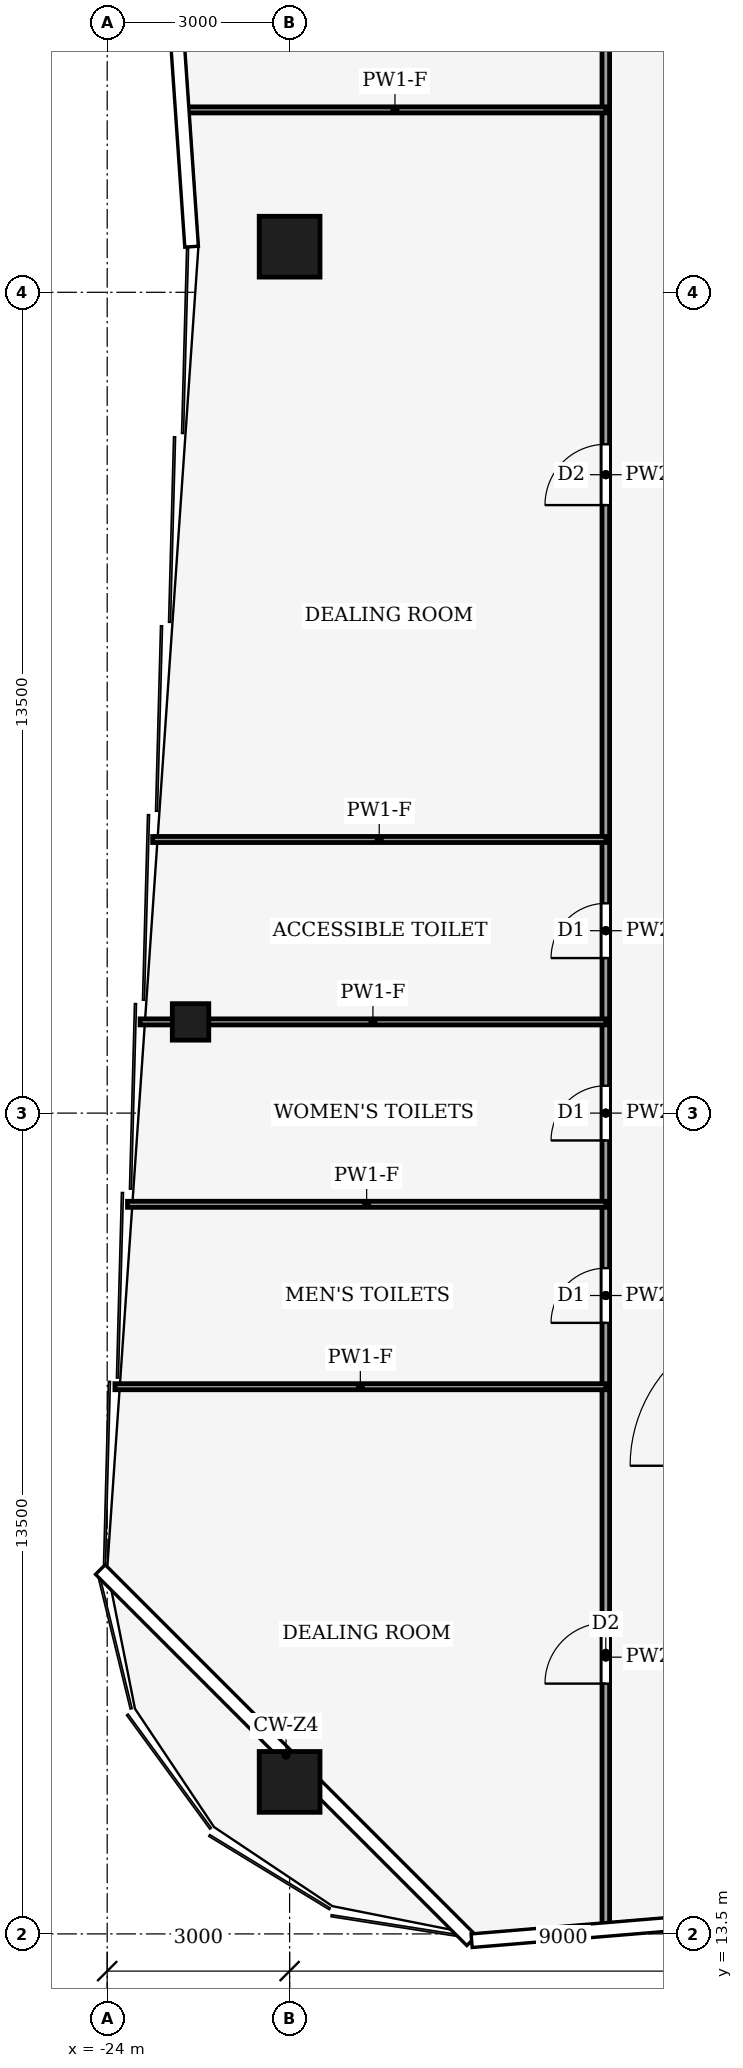
"""IFC4 building model, lengths in metres.
Left out: names, types, materials, properties, quantities, classifications, styles, units other than length and angle.
Written with IfcOpenShell. Run it as: python <this file> out.ifc"""

import sys

from ifc_helpers import new_model, si_unit, direction, frame, frame_2d, origin, origin_2d, place, context, subcontext, project, spatial, rectangle, hollow_rectangle, extrude, element, fill, save


model = new_model("IFC4")
c1 = context("Model", 3, precision=1e-05, world=origin(), true_north=direction((0.0, 1.0)))
c2 = subcontext(c1, "Body", "Model", "MODEL_VIEW")
j1 = project(units=[si_unit("LENGTHUNIT", "METRE"), si_unit("PLANEANGLEUNIT", "RADIAN")], contexts=[c1])
p1 = place(None, origin())
s1 = spatial("IfcSite", under=j1, at=p1, CompositionType="ELEMENT")
p2 = place(p1, origin())
s2 = spatial("IfcBuilding", under=s1, at=p2, CompositionType="ELEMENT")
p3 = place(p2, frame((0.0, 0.0, 258.0)))
s3 = spatial("IfcBuildingStorey", under=s2, at=p3, CompositionType="ELEMENT", Elevation=258.0)
for number, where, z_axis, x_axis in (
    (1, (-21.0, 16.0, 0.0), (0.0, 0.0, 1.0), (1.0, 0.0, 0.0)),
    (2, (-21.0, 41.25, 0.0), (0.0, 0.0, 1.0), (1.0, 0.0, 0.0)),
):
    element("IfcColumn", number, at=place(p3, frame(where, z_axis=z_axis, x_axis=x_axis)), inside=s3, PredefinedType="COLUMN", context=c2, shape_type="SweptSolid", body=[
        extrude(hollow_rectangle(XDim=1.0, YDim=1.0, WallThickness=0.045, at=origin_2d()), origin(), (0.0, 0.0, 1.0), 4.0),
    ])
p4 = place(p3, frame((-22.629, 28.5, 0.0), z_axis=(0.0, 0.0, 1.0), x_axis=(1.0, 0.0, 0.0)))
e3 = element("IfcColumn", 3, at=p4, inside=s3, PredefinedType="COLUMN", context=c2, shape_type="SweptSolid", body=[
    extrude(hollow_rectangle(XDim=0.6, YDim=0.6, WallThickness=0.025, at=origin_2d()), origin(), (0.0, 0.0, 1.0), 4.0),
])
p5 = place(p3, frame((-15.8, 13.603, 0.0), z_axis=(0.0, 0.0, 1.0), x_axis=(0.0, 1.0, 0.0)))
e4 = element("IfcWall", 4, at=p5, inside=s3, PredefinedType="PARTITIONING", context=c2, shape_type="SweptSolid", body=[
    extrude(rectangle(XDim=8.897, YDim=0.125, at=frame_2d((4.448, 0.0))), origin(), (0.0, 0.0, 1.0), 3.04),
])
p6 = place(p5, frame((4.013, 0.0, 0.0)))
e5 = element("IfcOpeningElement", 5, at=p6, cuts=e4, PredefinedType="OPENING", context=c2, shape_type="SweptSolid", body=[
    extrude(rectangle(XDim=1.0, YDim=2.1, at=frame_2d((0.5, 1.05))), frame((0.0, 0.073, 0.0), z_axis=(0.0, -1.0, 0.0), x_axis=(1.0, 0.0, 0.0)), (0.0, 0.0, 1.0), 0.145),
])
p7 = place(p3, frame((-15.8, 22.5, 0.0), z_axis=(0.0, 0.0, 1.0), x_axis=(0.0, 1.0, 0.0)))
e6 = element("IfcWall", 6, at=p7, inside=s3, PredefinedType="PARTITIONING", context=c2, shape_type="SweptSolid", body=[
    extrude(rectangle(XDim=3.0, YDim=0.125, at=frame_2d((1.5, 0.0))), origin(), (0.0, 0.0, 1.0), 3.44),
])
p8 = place(p7, frame((1.05, 0.0, 0.0)))
e7 = element("IfcOpeningElement", 7, at=p8, cuts=e6, PredefinedType="OPENING", context=c2, shape_type="SweptSolid", body=[
    extrude(rectangle(XDim=0.9, YDim=2.1, at=frame_2d((0.45, 1.05))), frame((0.0, 0.073, 0.0), z_axis=(0.0, -1.0, 0.0), x_axis=(1.0, 0.0, 0.0)), (0.0, 0.0, 1.0), 0.145),
])
p9 = place(p3, frame((-15.8, 25.5, 0.0), z_axis=(0.0, 0.0, 1.0), x_axis=(0.0, 1.0, 0.0)))
e8 = element("IfcWall", 8, at=p9, inside=s3, PredefinedType="PARTITIONING", context=c2, shape_type="SweptSolid", body=[
    extrude(rectangle(XDim=3.0, YDim=0.125, at=frame_2d((1.5, 0.0))), origin(), (0.0, 0.0, 1.0), 3.87),
])
p10 = place(p9, frame((1.05, 0.0, 0.0)))
e9 = element("IfcOpeningElement", 9, at=p10, cuts=e8, PredefinedType="OPENING", context=c2, shape_type="SweptSolid", body=[
    extrude(rectangle(XDim=0.9, YDim=2.1, at=frame_2d((0.45, 1.05))), frame((0.0, 0.073, 0.0), z_axis=(0.0, -1.0, 0.0), x_axis=(1.0, 0.0, 0.0)), (0.0, 0.0, 1.0), 0.145),
])
p11 = place(p3, frame((-15.8, 28.5, 0.0), z_axis=(0.0, 0.0, 1.0), x_axis=(0.0, 1.0, 0.0)))
e10 = element("IfcWall", 10, at=p11, inside=s3, PredefinedType="PARTITIONING", context=c2, shape_type="SweptSolid", body=[
    extrude(rectangle(XDim=3.0, YDim=0.125, at=frame_2d((1.5, 0.0))), origin(), (0.0, 0.0, 1.0), 3.87),
])
p12 = place(p11, frame((1.05, 0.0, 0.0)))
e11 = element("IfcOpeningElement", 11, at=p12, cuts=e10, PredefinedType="OPENING", context=c2, shape_type="SweptSolid", body=[
    extrude(rectangle(XDim=0.9, YDim=2.1, at=frame_2d((0.45, 1.05))), frame((0.0, 0.073, 0.0), z_axis=(0.0, -1.0, 0.0), x_axis=(1.0, 0.0, 0.0)), (0.0, 0.0, 1.0), 0.145),
])
p13 = place(p3, frame((-15.8, 31.5, 0.0), z_axis=(0.0, 0.0, 1.0), x_axis=(0.0, 1.0, 0.0)))
e12 = element("IfcWall", 12, at=p13, inside=s3, PredefinedType="PARTITIONING", context=c2, shape_type="SweptSolid", body=[
    extrude(rectangle(XDim=12.0, YDim=0.125, at=frame_2d((6.0, 0.0))), origin(), (0.0, 0.0, 1.0), 3.14),
])
p14 = place(p13, frame((5.5, 0.0, 0.0)))
e13 = element("IfcOpeningElement", 13, at=p14, cuts=e12, PredefinedType="OPENING", context=c2, shape_type="SweptSolid", body=[
    extrude(rectangle(XDim=1.0, YDim=2.1, at=frame_2d((0.5, 1.05))), frame((0.0, 0.073, 0.0), z_axis=(0.0, -1.0, 0.0), x_axis=(1.0, 0.0, 0.0)), (0.0, 0.0, 1.0), 0.145),
])
p15 = place(p3, frame((-15.8, 43.5, 0.0), z_axis=(0.0, 0.0, 1.0), x_axis=(0.0, 1.0, 0.0)))
e14 = element("IfcWall", 14, at=p15, inside=s3, PredefinedType="PARTITIONING", context=c2, shape_type="SweptSolid", body=[
    extrude(rectangle(XDim=9.0, YDim=0.125, at=frame_2d((4.5, 0.0))), origin(), (0.0, 0.0, 1.0), 3.24),
])
p16 = place(p15, frame((4.0, 0.0, 0.0)))
e15 = element("IfcOpeningElement", 15, at=p16, cuts=e14, PredefinedType="OPENING", context=c2, shape_type="SweptSolid", body=[
    extrude(rectangle(XDim=1.0, YDim=2.1, at=frame_2d((0.5, 1.05))), frame((0.0, 0.073, 0.0), z_axis=(0.0, -1.0, 0.0), x_axis=(1.0, 0.0, 0.0)), (0.0, 0.0, 1.0), 0.145),
])
p17 = place(p3, frame((-15.8, 22.5, 0.0), z_axis=(0.0, 0.0, 1.0), x_axis=(-1.0, 0.0, 0.0)))
e16 = element("IfcWall", 16, at=p17, inside=s3, PredefinedType="PARTITIONING", context=c2, shape_type="SweptSolid", body=[
    extrude(rectangle(XDim=8.073, YDim=0.1, at=frame_2d((4.037, 0.0))), origin(), (0.0, 0.0, 1.0), 3.04),
])
p18 = place(p3, frame((-15.8, 25.5, 0.0), z_axis=(0.0, 0.0, 1.0), x_axis=(-1.0, 0.0, 0.0)))
e17 = element("IfcWall", 17, at=p18, inside=s3, PredefinedType="PARTITIONING", context=c2, shape_type="SweptSolid", body=[
    extrude(rectangle(XDim=7.866, YDim=0.1, at=frame_2d((3.933, 0.0))), origin(), (0.0, 0.0, 1.0), 3.04),
])
p19 = place(p3, frame((-15.8, 28.5, 0.0), z_axis=(0.0, 0.0, 1.0), x_axis=(-1.0, 0.0, 0.0)))
e18 = element("IfcWall", 18, at=p19, inside=s3, PredefinedType="PARTITIONING", context=c2, shape_type="SweptSolid", body=[
    extrude(rectangle(XDim=7.659, YDim=0.1, at=frame_2d((3.83, 0.0))), origin(), (0.0, 0.0, 1.0), 3.04),
])
p20 = place(p3, frame((-15.8, 31.5, 0.0), z_axis=(0.0, 0.0, 1.0), x_axis=(-1.0, 0.0, 0.0)))
e19 = element("IfcWall", 19, at=p20, inside=s3, PredefinedType="PARTITIONING", context=c2, shape_type="SweptSolid", body=[
    extrude(rectangle(XDim=7.452, YDim=0.1, at=frame_2d((3.726, 0.0))), origin(), (0.0, 0.0, 1.0), 3.04),
])
p21 = place(p3, frame((-15.8, 43.5, 0.0), z_axis=(0.0, 0.0, 1.0), x_axis=(-1.0, 0.0, 0.0)))
e20 = element("IfcWall", 20, at=p21, inside=s3, PredefinedType="PARTITIONING", context=c2, shape_type="SweptSolid", body=[
    extrude(rectangle(XDim=6.935, YDim=0.1, at=frame_2d((3.468, 0.0))), origin(), (0.0, 0.0, 1.0), 3.04),
])
p22 = place(p6, origin())
e21 = element("IfcDoor", 21, at=p22, inside=s3, OperationType="SINGLE_SWING_RIGHT", PredefinedType="DOOR", context=c2, shape_type="SweptSolid", body=[
    extrude(rectangle(XDim=1.0, YDim=2.1, at=frame_2d((0.5, 1.05))), frame((0.0, 0.025, 0.0), z_axis=(0.0, -1.0, 0.0), x_axis=(1.0, 0.0, 0.0)), (0.0, 0.0, 1.0), 0.05),
])
fill(e5, e21)
p23 = place(p8, origin())
e22 = element("IfcDoor", 22, at=p23, inside=s3, OperationType="SINGLE_SWING_RIGHT", PredefinedType="DOOR", context=c2, shape_type="SweptSolid", body=[
    extrude(rectangle(XDim=0.9, YDim=2.1, at=frame_2d((0.45, 1.05))), frame((0.0, 0.025, 0.0), z_axis=(0.0, -1.0, 0.0), x_axis=(1.0, 0.0, 0.0)), (0.0, 0.0, 1.0), 0.05),
])
fill(e7, e22)
p24 = place(p10, origin())
e23 = element("IfcDoor", 23, at=p24, inside=s3, OperationType="SINGLE_SWING_LEFT", PredefinedType="DOOR", context=c2, shape_type="SweptSolid", body=[
    extrude(rectangle(XDim=0.9, YDim=2.1, at=frame_2d((0.45, 1.05))), frame((0.0, 0.025, 0.0), z_axis=(0.0, -1.0, 0.0), x_axis=(1.0, 0.0, 0.0)), (0.0, 0.0, 1.0), 0.05),
])
fill(e9, e23)
p25 = place(p12, origin())
e24 = element("IfcDoor", 24, at=p25, inside=s3, OperationType="SINGLE_SWING_RIGHT", PredefinedType="DOOR", context=c2, shape_type="SweptSolid", body=[
    extrude(rectangle(XDim=0.9, YDim=2.1, at=frame_2d((0.45, 1.05))), frame((0.0, 0.025, 0.0), z_axis=(0.0, -1.0, 0.0), x_axis=(1.0, 0.0, 0.0)), (0.0, 0.0, 1.0), 0.05),
])
fill(e11, e24)
p26 = place(p14, origin())
e25 = element("IfcDoor", 25, at=p26, inside=s3, OperationType="SINGLE_SWING_LEFT", PredefinedType="DOOR", context=c2, shape_type="SweptSolid", body=[
    extrude(rectangle(XDim=1.0, YDim=2.1, at=frame_2d((0.5, 1.05))), frame((0.0, 0.025, 0.0), z_axis=(0.0, -1.0, 0.0), x_axis=(1.0, 0.0, 0.0)), (0.0, 0.0, 1.0), 0.05),
])
fill(e13, e25)
save(model, sys.argv[1])
